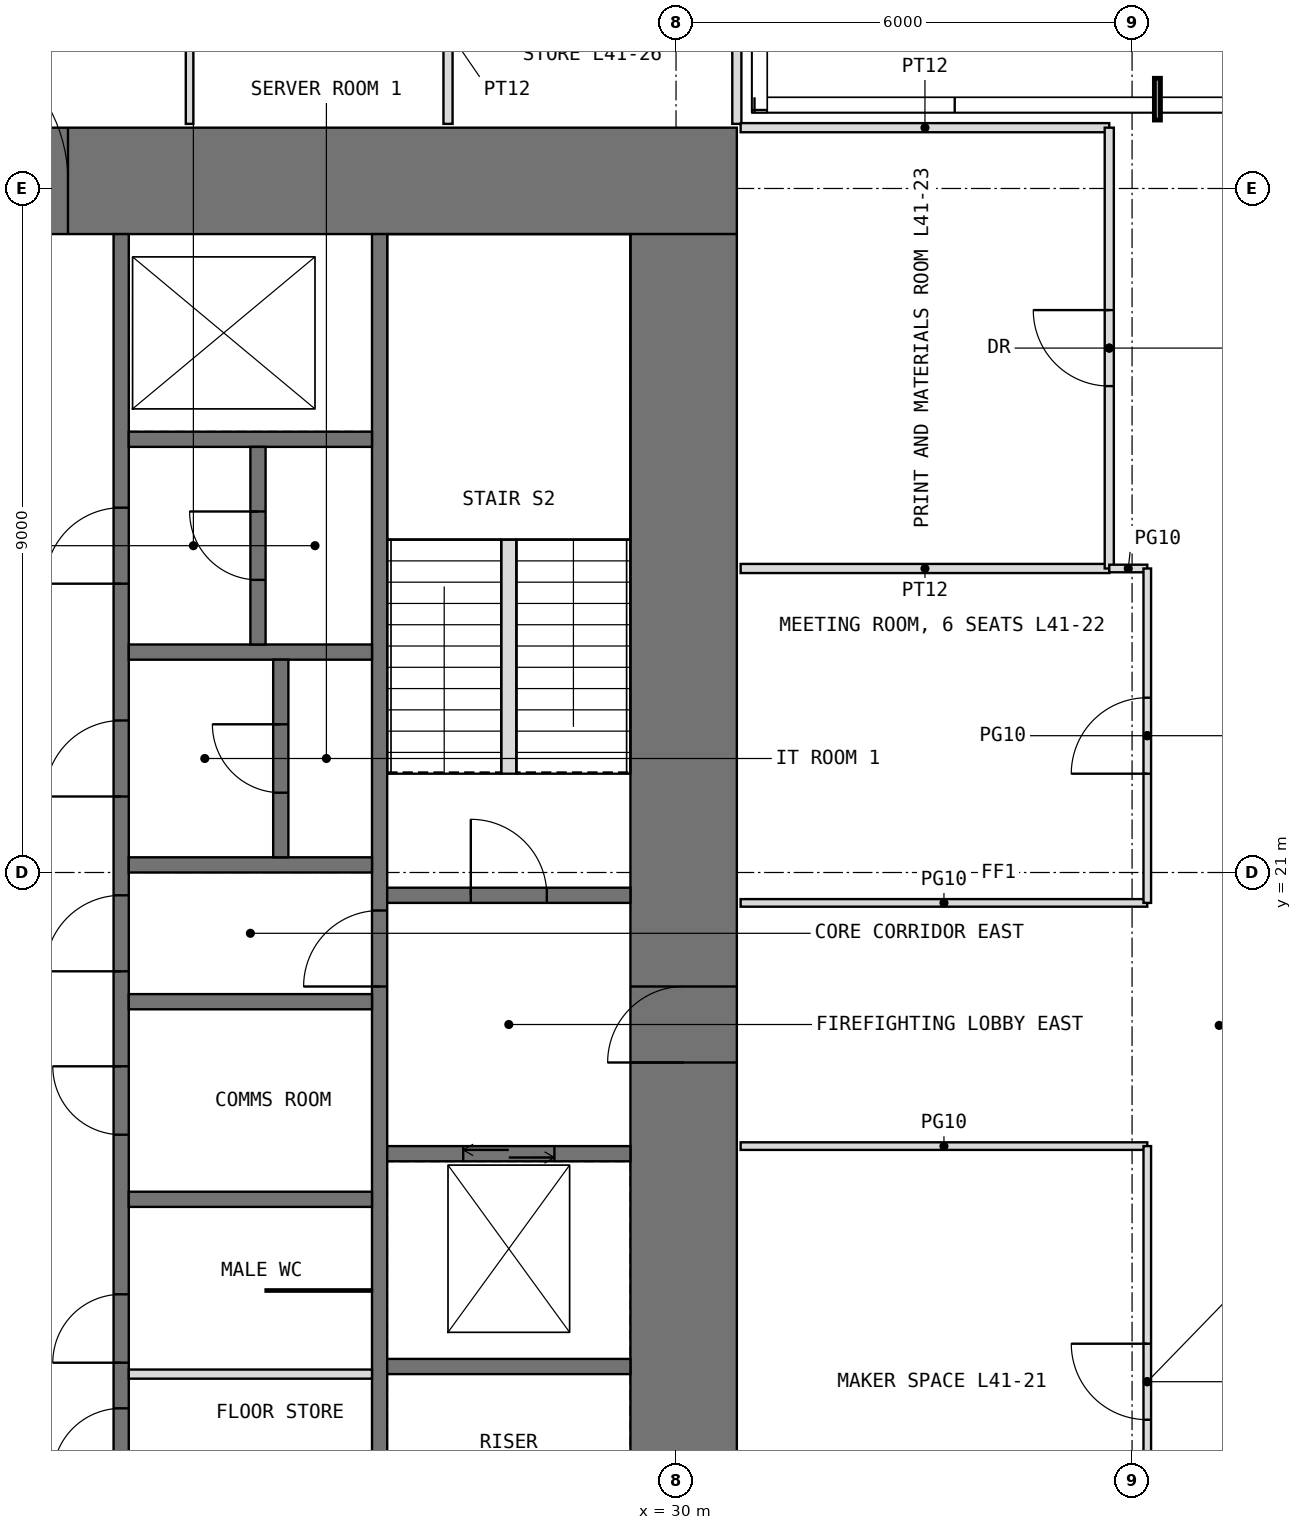
"""IFC4 building model, lengths in metres.
Left out: names, types, materials, properties, quantities, classifications, styles, units other than length and angle.
Written with IfcOpenShell. Run it as: python <this file> out.ifc"""

import sys

from ifc_helpers import new_model, si_unit, direction, frame, frame_2d, origin, place, context, subcontext, project, spatial, rectangle, extrude, element, fill, save


model = new_model("IFC4")
c1 = context("Model", 3, precision=1e-05, world=origin(), true_north=direction((0.0, 1.0)))
c2 = subcontext(c1, "Body", "Model", "MODEL_VIEW")
j1 = project(units=[si_unit("LENGTHUNIT", "METRE"), si_unit("PLANEANGLEUNIT", "RADIAN")], contexts=[c1])
p1 = place(None, origin())
s1 = spatial("IfcSite", under=j1, at=p1, CompositionType="ELEMENT")
p2 = place(p1, origin())
s2 = spatial("IfcBuilding", under=s1, at=p2, CompositionType="ELEMENT")
p3 = place(p2, frame((0.0, 0.0, 174.5)))
s3 = spatial("IfcBuildingStorey", under=s2, at=p3, CompositionType="ELEMENT", Elevation=174.5)
p4 = place(p3, frame((11.2, 30.1, -0.05), z_axis=(0.0, 0.0, 1.0), x_axis=(1.0, 0.0, 0.0)))
e1 = element("IfcWall", 1, at=p4, inside=s3, PredefinedType="SHEAR", context=c2, shape_type="SweptSolid", body=[
    extrude(rectangle(XDim=19.6, YDim=1.4, at=frame_2d((9.8, 0.0))), origin(), (0.0, 0.0, 1.0), 4.0),
])
p5 = place(p4, frame((8.8, 0.0, 0.05)))
e2 = element("IfcOpeningElement", 2, at=p5, cuts=e1, PredefinedType="OPENING", context=c2, shape_type="SweptSolid", body=[
    extrude(rectangle(XDim=2.0, YDim=2.2, at=frame_2d((1.0, 1.1))), frame((0.0, 0.71, 0.0), z_axis=(0.0, -1.0, 0.0), x_axis=(1.0, 0.0, 0.0)), (0.0, 0.0, 1.0), 1.42),
])
p6 = place(p3, frame((30.1, 12.6, -0.05), z_axis=(0.0, 0.0, 1.0), x_axis=(0.0, 1.0, 0.0)))
e3 = element("IfcWall", 3, at=p6, inside=s3, PredefinedType="SHEAR", context=c2, shape_type="SweptSolid", body=[
    extrude(rectangle(XDim=16.8, YDim=1.4, at=frame_2d((8.4, 0.0))), origin(), (0.0, 0.0, 1.0), 4.0),
])
p7 = place(p6, frame((5.9, 0.0, 0.05)))
e4 = element("IfcOpeningElement", 4, at=p7, cuts=e3, PredefinedType="OPENING", context=c2, shape_type="SweptSolid", body=[
    extrude(rectangle(XDim=1.0, YDim=2.2, at=frame_2d((0.5, 1.1))), frame((0.0, 0.71, 0.0), z_axis=(0.0, -1.0, 0.0), x_axis=(1.0, 0.0, 0.0)), (0.0, 0.0, 1.0), 1.42),
])
p8 = place(p3, frame((22.7, 12.6, -0.05), z_axis=(0.0, 0.0, 1.0), x_axis=(0.0, 1.0, 0.0)))
e5 = element("IfcWall", 5, at=p8, inside=s3, PredefinedType="SHEAR", context=c2, shape_type="SweptSolid", body=[
    extrude(rectangle(XDim=16.8, YDim=0.2, at=frame_2d((8.4, 0.0))), origin(), (0.0, 0.0, 1.0), 4.0),
])
p9 = place(p8, frame((0.45, 0.0, 0.05)))
e6 = element("IfcOpeningElement", 6, at=p9, cuts=e5, PredefinedType="OPENING", context=c2, shape_type="SweptSolid", body=[
    extrude(rectangle(XDim=0.9, YDim=2.2, at=frame_2d((0.45, 1.1))), frame((0.0, 0.11, 0.0), z_axis=(0.0, -1.0, 0.0), x_axis=(1.0, 0.0, 0.0)), (0.0, 0.0, 1.0), 0.22),
])
p10 = place(p8, frame((7.1, 0.0, 0.05)))
e7 = element("IfcOpeningElement", 7, at=p10, cuts=e5, PredefinedType="OPENING", context=c2, shape_type="SweptSolid", body=[
    extrude(rectangle(XDim=1.0, YDim=2.2, at=frame_2d((0.5, 1.1))), frame((0.0, 0.11, 0.0), z_axis=(0.0, -1.0, 0.0), x_axis=(1.0, 0.0, 0.0)), (0.0, 0.0, 1.0), 0.22),
])
p11 = place(p8, frame((1.95, 0.0, 0.05)))
e8 = element("IfcOpeningElement", 8, at=p11, cuts=e5, PredefinedType="OPENING", context=c2, shape_type="SweptSolid", body=[
    extrude(rectangle(XDim=0.9, YDim=2.2, at=frame_2d((0.45, 1.1))), frame((0.0, 0.11, 0.0), z_axis=(0.0, -1.0, 0.0), x_axis=(1.0, 0.0, 0.0)), (0.0, 0.0, 1.0), 0.22),
])
p12 = place(p8, frame((4.95, 0.0, 0.05)))
e9 = element("IfcOpeningElement", 9, at=p12, cuts=e5, PredefinedType="OPENING", context=c2, shape_type="SweptSolid", body=[
    extrude(rectangle(XDim=0.9, YDim=2.2, at=frame_2d((0.45, 1.1))), frame((0.0, 0.11, 0.0), z_axis=(0.0, -1.0, 0.0), x_axis=(1.0, 0.0, 0.0)), (0.0, 0.0, 1.0), 0.22),
])
p13 = place(p8, frame((9.4, 0.0, 0.05)))
e10 = element("IfcOpeningElement", 10, at=p13, cuts=e5, PredefinedType="OPENING", context=c2, shape_type="SweptSolid", body=[
    extrude(rectangle(XDim=1.0, YDim=2.2, at=frame_2d((0.5, 1.1))), frame((0.0, 0.11, 0.0), z_axis=(0.0, -1.0, 0.0), x_axis=(1.0, 0.0, 0.0)), (0.0, 0.0, 1.0), 0.22),
])
p14 = place(p8, frame((12.2, 0.0, 0.05)))
e11 = element("IfcOpeningElement", 11, at=p14, cuts=e5, PredefinedType="OPENING", context=c2, shape_type="SweptSolid", body=[
    extrude(rectangle(XDim=1.0, YDim=2.2, at=frame_2d((0.5, 1.1))), frame((0.0, 0.11, 0.0), z_axis=(0.0, -1.0, 0.0), x_axis=(1.0, 0.0, 0.0)), (0.0, 0.0, 1.0), 0.22),
])
p15 = place(p3, frame((26.1, 12.6, -0.05), z_axis=(0.0, 0.0, 1.0), x_axis=(0.0, 1.0, 0.0)))
e12 = element("IfcWall", 12, at=p15, inside=s3, PredefinedType="SHEAR", context=c2, shape_type="SweptSolid", body=[
    extrude(rectangle(XDim=16.8, YDim=0.2, at=frame_2d((8.4, 0.0))), origin(), (0.0, 0.0, 1.0), 4.0),
])
p16 = place(p15, frame((6.9, 0.0, 0.05)))
e13 = element("IfcOpeningElement", 13, at=p16, cuts=e12, PredefinedType="OPENING", context=c2, shape_type="SweptSolid", body=[
    extrude(rectangle(XDim=1.0, YDim=2.2, at=frame_2d((0.5, 1.1))), frame((0.0, 0.11, 0.0), z_axis=(0.0, -1.0, 0.0), x_axis=(1.0, 0.0, 0.0)), (0.0, 0.0, 1.0), 0.22),
])
for number, where, z_axis, x_axis in (
    (14, (22.8, 16.7, -0.05), (0.0, 0.0, 1.0), (1.0, 0.0, 0.0)),
    (15, (22.8, 19.3, -0.05), (0.0, 0.0, 1.0), (1.0, 0.0, 0.0)),
    (16, (22.8, 21.1, -0.05), (0.0, 0.0, 1.0), (1.0, 0.0, 0.0)),
    (17, (22.8, 23.9, -0.05), (0.0, 0.0, 1.0), (1.0, 0.0, 0.0)),
    (18, (22.8, 26.7, -0.05), (0.0, 0.0, 1.0), (1.0, 0.0, 0.0)),
    (19, (26.2, 14.5, -0.05), (0.0, 0.0, 1.0), (1.0, 0.0, 0.0)),
):
    element("IfcWall", number, at=place(p3, frame(where, z_axis=z_axis, x_axis=x_axis)), inside=s3, PredefinedType="SHEAR", context=c2, shape_type="SweptSolid", body=[
        extrude(rectangle(XDim=3.2, YDim=0.2, at=frame_2d((1.6, 0.0))), origin(), (0.0, 0.0, 1.0), 4.0),
    ])
p17 = place(p3, frame((26.2, 17.3, -0.05), z_axis=(0.0, 0.0, 1.0), x_axis=(1.0, 0.0, 0.0)))
e20 = element("IfcWall", 20, at=p17, inside=s3, PredefinedType="SHEAR", context=c2, shape_type="SweptSolid", body=[
    extrude(rectangle(XDim=3.2, YDim=0.2, at=frame_2d((1.6, 0.0))), origin(), (0.0, 0.0, 1.0), 4.0),
])
p18 = place(p17, frame((1.0, 0.0, 0.05)))
e21 = element("IfcOpeningElement", 21, at=p18, cuts=e20, PredefinedType="OPENING", context=c2, shape_type="SweptSolid", body=[
    extrude(rectangle(XDim=1.2, YDim=2.2, at=frame_2d((0.6, 1.1))), frame((0.0, 0.11, 0.0), z_axis=(0.0, -1.0, 0.0), x_axis=(1.0, 0.0, 0.0)), (0.0, 0.0, 1.0), 0.22),
])
p19 = place(p3, frame((26.2, 20.7, -0.05), z_axis=(0.0, 0.0, 1.0), x_axis=(1.0, 0.0, 0.0)))
e22 = element("IfcWall", 22, at=p19, inside=s3, PredefinedType="SHEAR", context=c2, shape_type="SweptSolid", body=[
    extrude(rectangle(XDim=3.2, YDim=0.2, at=frame_2d((1.6, 0.0))), origin(), (0.0, 0.0, 1.0), 4.0),
])
p20 = place(p19, frame((1.1, 0.0, 0.05)))
e23 = element("IfcOpeningElement", 23, at=p20, cuts=e22, PredefinedType="OPENING", context=c2, shape_type="SweptSolid", body=[
    extrude(rectangle(XDim=1.0, YDim=2.2, at=frame_2d((0.5, 1.1))), frame((0.0, 0.11, 0.0), z_axis=(0.0, -1.0, 0.0), x_axis=(1.0, 0.0, 0.0)), (0.0, 0.0, 1.0), 0.22),
])
p21 = place(p3, frame((22.8, 14.4, 0.0), z_axis=(0.0, 0.0, 1.0), x_axis=(1.0, 0.0, 0.0)))
e24 = element("IfcWall", 24, at=p21, inside=s3, PredefinedType="PARTITIONING", context=c2, shape_type="SweptSolid", body=[
    extrude(rectangle(XDim=3.2, YDim=0.12, at=frame_2d((1.6, 0.0))), origin(), (0.0, 0.0, 1.0), 3.75),
])
p22 = place(p3, frame((24.6, 15.5, 0.0), z_axis=(0.0, 0.0, 1.0), x_axis=(1.0, 0.0, 0.0)))
e25 = element("IfcWall", 25, at=p22, inside=s3, PredefinedType="PARTITIONING", context=c2, shape_type="SweptSolid", body=[
    extrude(rectangle(XDim=1.4, YDim=0.03, at=frame_2d((0.7, 0.0))), origin(), (0.0, 0.0, 1.0), 3.75),
])
p23 = place(p3, frame((24.8, 21.2, -0.05), z_axis=(0.0, 0.0, 1.0), x_axis=(0.0, 1.0, 0.0)))
e26 = element("IfcWall", 26, at=p23, inside=s3, PredefinedType="SHEAR", context=c2, shape_type="SweptSolid", body=[
    extrude(rectangle(XDim=2.6, YDim=0.2, at=frame_2d((1.3, 0.0))), origin(), (0.0, 0.0, 1.0), 4.0),
])
p24 = place(p23, frame((0.85, 0.0, 0.05)))
e27 = element("IfcOpeningElement", 27, at=p24, cuts=e26, PredefinedType="OPENING", context=c2, shape_type="SweptSolid", body=[
    extrude(rectangle(XDim=0.9, YDim=2.2, at=frame_2d((0.45, 1.1))), frame((0.0, 0.11, 0.0), z_axis=(0.0, -1.0, 0.0), x_axis=(1.0, 0.0, 0.0)), (0.0, 0.0, 1.0), 0.22),
])
p25 = place(p3, frame((24.5, 24.0, -0.05), z_axis=(0.0, 0.0, 1.0), x_axis=(0.0, 1.0, 0.0)))
e28 = element("IfcWall", 28, at=p25, inside=s3, PredefinedType="SHEAR", context=c2, shape_type="SweptSolid", body=[
    extrude(rectangle(XDim=2.6, YDim=0.2, at=frame_2d((1.3, 0.0))), origin(), (0.0, 0.0, 1.0), 4.0),
])
p26 = place(p25, frame((0.85, 0.0, 0.05)))
e29 = element("IfcOpeningElement", 29, at=p26, cuts=e28, PredefinedType="OPENING", context=c2, shape_type="SweptSolid", body=[
    extrude(rectangle(XDim=0.9, YDim=2.2, at=frame_2d((0.45, 1.1))), frame((0.0, 0.11, 0.0), z_axis=(0.0, -1.0, 0.0), x_axis=(1.0, 0.0, 0.0)), (0.0, 0.0, 1.0), 0.22),
])
p27 = place(p3, frame((23.6, 30.85, 0.0), z_axis=(0.0, 0.0, 1.0), x_axis=(0.0, 1.0, 0.0)))
e30 = element("IfcWall", 30, at=p27, inside=s3, PredefinedType="PARTITIONING", context=c2, shape_type="SweptSolid", body=[
    extrude(rectangle(XDim=2.95, YDim=0.1, at=frame_2d((1.475, 0.0))), origin(), (0.0, 0.0, 1.0), 3.75),
])
for number, where, z_axis, x_axis in (
    (31, (27.0, 30.85, 0.0), (0.0, 0.0, 1.0), (0.0, 1.0, 0.0)),
    (32, (30.8, 30.85, 0.0), (0.0, 0.0, 1.0), (0.0, 1.0, 0.0)),
):
    element("IfcWall", number, at=place(p3, frame(where, z_axis=z_axis, x_axis=x_axis)), inside=s3, PredefinedType="PARTITIONING", context=c2, shape_type="SweptSolid", body=[
        extrude(rectangle(XDim=2.45, YDim=0.12, at=frame_2d((1.225, 0.0))), origin(), (0.0, 0.0, 1.0), 3.75),
    ])
for number, where, z_axis, x_axis in (
    (33, (30.85, 17.4, 0.0), (0.0, 0.0, 1.0), (1.0, 0.0, 0.0)),
    (34, (30.85, 20.6, 0.0), (0.0, 0.0, 1.0), (1.0, 0.0, 0.0)),
):
    element("IfcWall", number, at=place(p3, frame(where, z_axis=z_axis, x_axis=x_axis)), inside=s3, PredefinedType="PARTITIONING", context=c2, shape_type="SweptSolid", body=[
        extrude(rectangle(XDim=5.35, YDim=0.1, at=frame_2d((2.675, 0.0))), origin(), (0.0, 0.0, 1.0), 3.75),
    ])
for number, where, z_axis, x_axis in (
    (35, (30.85, 25.0, 0.0), (0.0, 0.0, 1.0), (1.0, 0.0, 0.0)),
    (36, (30.85, 30.8, 0.0), (0.0, 0.0, 1.0), (1.0, 0.0, 0.0)),
):
    element("IfcWall", number, at=place(p3, frame(where, z_axis=z_axis, x_axis=x_axis)), inside=s3, PredefinedType="PARTITIONING", context=c2, shape_type="SweptSolid", body=[
        extrude(rectangle(XDim=4.85, YDim=0.12, at=frame_2d((2.425, 0.0))), origin(), (0.0, 0.0, 1.0), 3.75),
    ])
p28 = place(p3, frame((35.7, 25.0, 0.0), z_axis=(0.0, 0.0, 1.0), x_axis=(0.0, 1.0, 0.0)))
e37 = element("IfcWall", 37, at=p28, inside=s3, PredefinedType="PARTITIONING", context=c2, shape_type="SweptSolid", body=[
    extrude(rectangle(XDim=5.8, YDim=0.12, at=frame_2d((2.9, 0.0))), origin(), (0.0, 0.0, 1.0), 3.75),
])
p29 = place(p28, frame((2.4, 0.0, 0.0)))
e38 = element("IfcOpeningElement", 38, at=p29, cuts=e37, PredefinedType="OPENING", context=c2, shape_type="SweptSolid", body=[
    extrude(rectangle(XDim=1.0, YDim=2.2, at=frame_2d((0.5, 1.1))), frame((0.0, 0.07, 0.0), z_axis=(0.0, -1.0, 0.0), x_axis=(1.0, 0.0, 0.0)), (0.0, 0.0, 1.0), 0.14),
])
p30 = place(p3, frame((35.7, 25.0, 0.0), z_axis=(0.0, 0.0, 1.0), x_axis=(1.0, 0.0, 0.0)))
e39 = element("IfcWall", 39, at=p30, inside=s3, PredefinedType="PARTITIONING", context=c2, shape_type="SweptSolid", body=[
    extrude(rectangle(XDim=0.5, YDim=0.1, at=frame_2d((0.25, 0.0))), origin(), (0.0, 0.0, 1.0), 3.75),
])
p31 = place(p3, frame((36.2, 11.2, 0.0), z_axis=(0.0, 0.0, 1.0), x_axis=(0.0, 1.0, 0.0)))
e40 = element("IfcWall", 40, at=p31, inside=s3, PredefinedType="PARTITIONING", context=c2, shape_type="SweptSolid", body=[
    extrude(rectangle(XDim=6.2, YDim=0.1, at=frame_2d((3.1, 0.0))), origin(), (0.0, 0.0, 1.0), 3.75),
])
p32 = place(p31, frame((2.6, 0.0, 0.0)))
e41 = element("IfcOpeningElement", 41, at=p32, cuts=e40, PredefinedType="OPENING", context=c2, shape_type="SweptSolid", body=[
    extrude(rectangle(XDim=1.0, YDim=2.4, at=frame_2d((0.5, 1.2))), frame((0.0, 0.06, 0.0), z_axis=(0.0, -1.0, 0.0), x_axis=(1.0, 0.0, 0.0)), (0.0, 0.0, 1.0), 0.12),
])
p33 = place(p3, frame((36.2, 20.6, 0.0), z_axis=(0.0, 0.0, 1.0), x_axis=(0.0, 1.0, 0.0)))
e42 = element("IfcWall", 42, at=p33, inside=s3, PredefinedType="PARTITIONING", context=c2, shape_type="SweptSolid", body=[
    extrude(rectangle(XDim=4.4, YDim=0.1, at=frame_2d((2.2, 0.0))), origin(), (0.0, 0.0, 1.0), 3.75),
])
p34 = place(p33, frame((1.7, 0.0, 0.0)))
e43 = element("IfcOpeningElement", 43, at=p34, cuts=e42, PredefinedType="OPENING", context=c2, shape_type="SweptSolid", body=[
    extrude(rectangle(XDim=1.0, YDim=2.4, at=frame_2d((0.5, 1.2))), frame((0.0, 0.06, 0.0), z_axis=(0.0, -1.0, 0.0), x_axis=(1.0, 0.0, 0.0)), (0.0, 0.0, 1.0), 0.12),
])
p35 = place(p3, frame((27.8, 22.3, 0.0), z_axis=(0.0, 0.0, 1.0), x_axis=(0.0, 1.0, 0.0)))
e44 = element("IfcWall", 44, at=p35, inside=s3, PredefinedType="PARTITIONING", context=c2, shape_type="SweptSolid", body=[
    extrude(rectangle(XDim=3.08, YDim=0.2, at=frame_2d((1.54, 0.0))), origin(), (0.0, 0.0, 1.0), 4.0),
])
p36 = place(p5, origin())
e45 = element("IfcDoor", 45, at=p36, inside=s3, OperationType="DOUBLE_DOOR_SINGLE_SWING", PredefinedType="DOOR", context=c2, shape_type="SweptSolid", body=[
    extrude(rectangle(XDim=2.0, YDim=2.2, at=frame_2d((1.0, 1.1))), frame((0.0, 0.025, 0.0), z_axis=(0.0, -1.0, 0.0), x_axis=(1.0, 0.0, 0.0)), (0.0, 0.0, 1.0), 0.05),
])
fill(e2, e45)
p37 = place(p9, origin())
e46 = element("IfcDoor", 46, at=p37, inside=s3, OperationType="SINGLE_SWING_LEFT", PredefinedType="DOOR", context=c2, shape_type="SweptSolid", body=[
    extrude(rectangle(XDim=0.9, YDim=2.2, at=frame_2d((0.45, 1.1))), frame((0.0, 0.025, 0.0), z_axis=(0.0, -1.0, 0.0), x_axis=(1.0, 0.0, 0.0)), (0.0, 0.0, 1.0), 0.05),
])
fill(e6, e46)
p38 = place(p7, origin())
e47 = element("IfcDoor", 47, at=p38, inside=s3, OperationType="SINGLE_SWING_LEFT", PredefinedType="DOOR", context=c2, shape_type="SweptSolid", body=[
    extrude(rectangle(XDim=1.0, YDim=2.2, at=frame_2d((0.5, 1.1))), frame((0.0, 0.025, 0.0), z_axis=(0.0, -1.0, 0.0), x_axis=(1.0, 0.0, 0.0)), (0.0, 0.0, 1.0), 0.05),
])
fill(e4, e47)
p39 = place(p20, origin())
e48 = element("IfcDoor", 48, at=p39, inside=s3, OperationType="SINGLE_SWING_LEFT", PredefinedType="DOOR", context=c2, shape_type="SweptSolid", body=[
    extrude(rectangle(XDim=1.0, YDim=2.2, at=frame_2d((0.5, 1.1))), frame((0.0, 0.025, 0.0), z_axis=(0.0, -1.0, 0.0), x_axis=(1.0, 0.0, 0.0)), (0.0, 0.0, 1.0), 0.05),
])
fill(e23, e48)
p40 = place(p16, origin())
e49 = element("IfcDoor", 49, at=p40, inside=s3, OperationType="SINGLE_SWING_LEFT", PredefinedType="DOOR", context=c2, shape_type="SweptSolid", body=[
    extrude(rectangle(XDim=1.0, YDim=2.2, at=frame_2d((0.5, 1.1))), frame((0.0, 0.025, 0.0), z_axis=(0.0, -1.0, 0.0), x_axis=(1.0, 0.0, 0.0)), (0.0, 0.0, 1.0), 0.05),
])
fill(e13, e49)
p41 = place(p10, origin())
e50 = element("IfcDoor", 50, at=p41, inside=s3, OperationType="SINGLE_SWING_LEFT", PredefinedType="DOOR", context=c2, shape_type="SweptSolid", body=[
    extrude(rectangle(XDim=1.0, YDim=2.2, at=frame_2d((0.5, 1.1))), frame((0.0, 0.025, 0.0), z_axis=(0.0, -1.0, 0.0), x_axis=(1.0, 0.0, 0.0)), (0.0, 0.0, 1.0), 0.05),
])
fill(e7, e50)
p42 = place(p11, origin())
e51 = element("IfcDoor", 51, at=p42, inside=s3, OperationType="SINGLE_SWING_LEFT", PredefinedType="DOOR", context=c2, shape_type="SweptSolid", body=[
    extrude(rectangle(XDim=0.9, YDim=2.2, at=frame_2d((0.45, 1.1))), frame((0.0, 0.025, 0.0), z_axis=(0.0, -1.0, 0.0), x_axis=(1.0, 0.0, 0.0)), (0.0, 0.0, 1.0), 0.05),
])
fill(e8, e51)
p43 = place(p12, origin())
e52 = element("IfcDoor", 52, at=p43, inside=s3, OperationType="SINGLE_SWING_RIGHT", PredefinedType="DOOR", context=c2, shape_type="SweptSolid", body=[
    extrude(rectangle(XDim=0.9, YDim=2.2, at=frame_2d((0.45, 1.1))), frame((0.0, 0.025, 0.0), z_axis=(0.0, -1.0, 0.0), x_axis=(1.0, 0.0, 0.0)), (0.0, 0.0, 1.0), 0.05),
])
fill(e9, e52)
p44 = place(p13, origin())
e53 = element("IfcDoor", 53, at=p44, inside=s3, OperationType="SINGLE_SWING_LEFT", PredefinedType="DOOR", context=c2, shape_type="SweptSolid", body=[
    extrude(rectangle(XDim=1.0, YDim=2.2, at=frame_2d((0.5, 1.1))), frame((0.0, 0.025, 0.0), z_axis=(0.0, -1.0, 0.0), x_axis=(1.0, 0.0, 0.0)), (0.0, 0.0, 1.0), 0.05),
])
fill(e10, e53)
p45 = place(p24, origin())
e54 = element("IfcDoor", 54, at=p45, inside=s3, OperationType="SINGLE_SWING_RIGHT", PredefinedType="DOOR", context=c2, shape_type="SweptSolid", body=[
    extrude(rectangle(XDim=0.9, YDim=2.2, at=frame_2d((0.45, 1.1))), frame((0.0, 0.025, 0.0), z_axis=(0.0, -1.0, 0.0), x_axis=(1.0, 0.0, 0.0)), (0.0, 0.0, 1.0), 0.05),
])
fill(e27, e54)
p46 = place(p14, origin())
e55 = element("IfcDoor", 55, at=p46, inside=s3, OperationType="SINGLE_SWING_LEFT", PredefinedType="DOOR", context=c2, shape_type="SweptSolid", body=[
    extrude(rectangle(XDim=1.0, YDim=2.2, at=frame_2d((0.5, 1.1))), frame((0.0, 0.025, 0.0), z_axis=(0.0, -1.0, 0.0), x_axis=(1.0, 0.0, 0.0)), (0.0, 0.0, 1.0), 0.05),
])
fill(e11, e55)
p47 = place(p26, origin())
e56 = element("IfcDoor", 56, at=p47, inside=s3, OperationType="SINGLE_SWING_RIGHT", PredefinedType="DOOR", context=c2, shape_type="SweptSolid", body=[
    extrude(rectangle(XDim=0.9, YDim=2.2, at=frame_2d((0.45, 1.1))), frame((0.0, 0.025, 0.0), z_axis=(0.0, -1.0, 0.0), x_axis=(1.0, 0.0, 0.0)), (0.0, 0.0, 1.0), 0.05),
])
fill(e29, e56)
p48 = place(p32, origin())
e57 = element("IfcDoor", 57, at=p48, inside=s3, OperationType="SINGLE_SWING_RIGHT", PredefinedType="DOOR", context=c2, shape_type="SweptSolid", body=[
    extrude(rectangle(XDim=1.0, YDim=2.4, at=frame_2d((0.5, 1.2))), frame((0.0, 0.025, 0.0), z_axis=(0.0, -1.0, 0.0), x_axis=(1.0, 0.0, 0.0)), (0.0, 0.0, 1.0), 0.05),
])
fill(e41, e57)
p49 = place(p34, origin())
e58 = element("IfcDoor", 58, at=p49, inside=s3, OperationType="SINGLE_SWING_LEFT", PredefinedType="DOOR", context=c2, shape_type="SweptSolid", body=[
    extrude(rectangle(XDim=1.0, YDim=2.4, at=frame_2d((0.5, 1.2))), frame((0.0, 0.025, 0.0), z_axis=(0.0, -1.0, 0.0), x_axis=(1.0, 0.0, 0.0)), (0.0, 0.0, 1.0), 0.05),
])
fill(e43, e58)
p50 = place(p29, origin())
e59 = element("IfcDoor", 59, at=p50, inside=s3, OperationType="SINGLE_SWING_RIGHT", PredefinedType="DOOR", context=c2, shape_type="SweptSolid", body=[
    extrude(rectangle(XDim=1.0, YDim=2.2, at=frame_2d((0.5, 1.1))), frame((0.0, 0.025, 0.0), z_axis=(0.0, -1.0, 0.0), x_axis=(1.0, 0.0, 0.0)), (0.0, 0.0, 1.0), 0.05),
])
fill(e38, e59)
p51 = place(p18, origin())
e60 = element("IfcDoor", 60, at=p51, inside=s3, OperationType="DOUBLE_DOOR_SLIDING", PredefinedType="DOOR", context=c2, shape_type="SweptSolid", body=[
    extrude(rectangle(XDim=1.2, YDim=2.2, at=frame_2d((0.6, 1.1))), frame((0.0, 0.025, 0.0), z_axis=(0.0, -1.0, 0.0), x_axis=(1.0, 0.0, 0.0)), (0.0, 0.0, 1.0), 0.05),
])
fill(e21, e60)
save(model, sys.argv[1])
